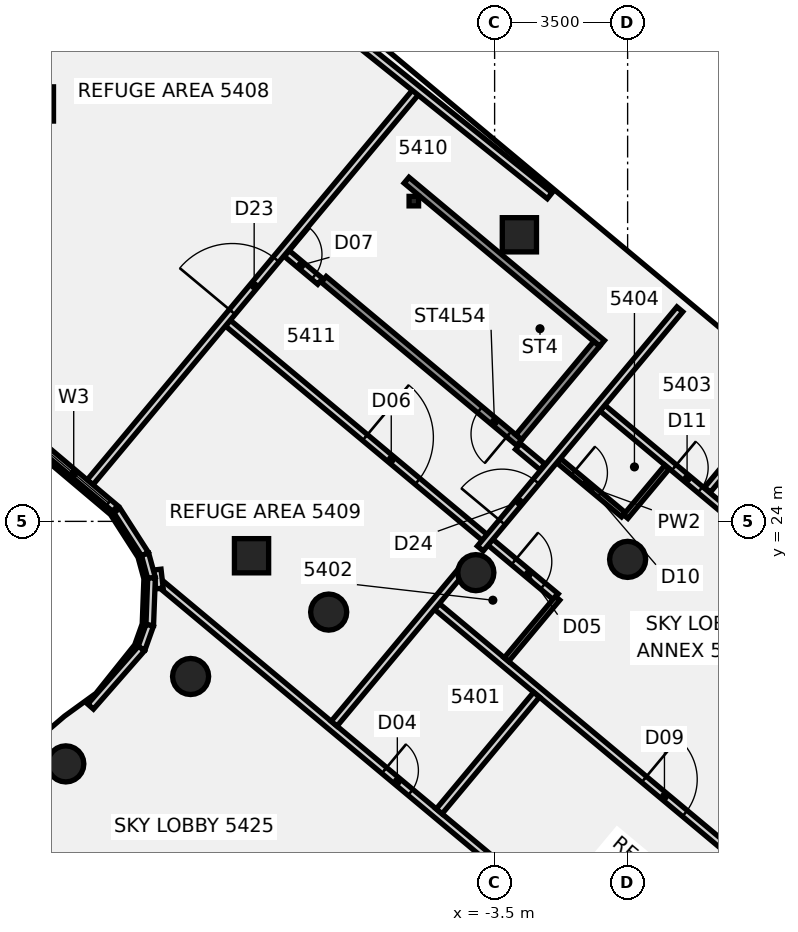
"""IFC4 building model, lengths in metres.
Left out: names, types, materials, properties, quantities, classifications, styles, units other than length and angle.
Written with IfcOpenShell. Run it as: python <this file> out.ifc"""

import sys

from ifc_helpers import new_model, si_unit, direction, frame, frame_2d, origin, origin_2d, place, context, subcontext, project, spatial, polyline, rectangle, circle, outline, extrude, element, fill, save


model = new_model("IFC4")
c1 = context("Model", 3, precision=1e-05, world=origin(), true_north=direction((0.0, 1.0)))
c2 = subcontext(c1, "Body", "Model", "MODEL_VIEW")
j1 = project(units=[si_unit("LENGTHUNIT", "METRE"), si_unit("PLANEANGLEUNIT", "RADIAN")], contexts=[c1])
p1 = place(None, origin())
s1 = spatial("IfcSite", under=j1, at=p1, CompositionType="ELEMENT")
p2 = place(p1, origin())
s2 = spatial("IfcBuilding", under=s1, at=p2, CompositionType="ELEMENT")
p3 = place(p2, frame((0.0, 0.0, 214.9)))
s3 = spatial("IfcBuildingStorey", under=s2, at=p3, CompositionType="ELEMENT", Elevation=214.9)
for number, where, z_axis, x_axis in (
    (1, (0.0, 23.0, -0.18), (0.0, 0.0, 1.0), (1.0, 0.0, 0.0)),
    (2, (-3.994, 22.651, -0.18), (0.0, 0.0, 1.0), (1.0, 0.0, 0.0)),
    (3, (-7.866, 21.613, -0.18), (0.0, 0.0, 1.0), (1.0, 0.0, 0.0)),
    (4, (-11.5, 19.919, -0.18), (0.0, 0.0, 1.0), (1.0, 0.0, 0.0)),
    (5, (-14.784, 17.619, -0.18), (0.0, 0.0, 1.0), (1.0, 0.0, 0.0)),
):
    element("IfcColumn", number, at=place(p3, frame(where, z_axis=z_axis, x_axis=x_axis)), inside=s3, PredefinedType="COLUMN", context=c2, shape_type="SweptSolid", body=[
        extrude(circle(Radius=0.475, at=origin_2d()), origin(), (0.0, 0.0, 1.0), 5.04),
    ])
p4 = place(p3, frame((-9.896, 23.096, -0.174), z_axis=(-0.00363877131, -0.03580550969, 0.999352152556), x_axis=(0.640801875223, 0.767126989756, 0.029818422132)))
e6 = element("IfcColumn", 6, at=p4, inside=s3, PredefinedType="COLUMN", context=c2, shape_type="SweptSolid", body=[
    extrude(rectangle(XDim=0.9, YDim=0.9, at=origin_2d()), origin(), (0.0, 0.0, 1.0), 5.032),
])
p5 = place(p3, frame((-2.848, 31.541, -0.174), z_axis=(-0.034396852958, -0.010576183279, 0.999352290663), x_axis=(0.766821630693, -0.641560817298, 0.019603683576)))
e7 = element("IfcColumn", 7, at=p5, inside=s3, PredefinedType="COLUMN", context=c2, shape_type="SweptSolid", body=[
    extrude(rectangle(XDim=0.9, YDim=0.9, at=origin_2d()), origin(), (0.0, 0.0, 1.0), 5.032),
])
p6 = place(p3, frame((-15.557, 34.983, -0.164), z_axis=(0.042488122715, -0.127416086189, 0.990938898423), x_axis=(0.642340953018, 0.763161584743, 0.070586795141)))
e8 = element("IfcColumn", 8, at=p6, inside=s3, PredefinedType="COLUMN", context=c2, shape_type="SweptSolid", body=[
    extrude(rectangle(XDim=0.9, YDim=0.9, at=origin_2d()), origin(), (0.0, 0.0, 1.0), 5.057),
])
p7 = place(p3, frame((-12.256, 22.329, 0.0), z_axis=(0.0, 0.0, 1.0), x_axis=(0.767726730688, -0.640777392693, 0.0)))
e9 = element("IfcWall", 9, at=p7, inside=s3, PredefinedType="PARTITIONING", context=c2, shape_type="SweptSolid", body=[
    extrude(rectangle(XDim=16.031, YDim=0.2, at=frame_2d((8.016, 0.0))), origin(), (0.0, 0.0, 1.0), 4.16),
])
p8 = place(p7, frame((7.62, 0.0, 0.0)))
e10 = element("IfcOpeningElement", 10, at=p8, cuts=e9, PredefinedType="OPENING", context=c2, shape_type="SweptSolid", body=[
    extrude(rectangle(XDim=0.9, YDim=2.1, at=frame_2d((0.45, 1.05))), frame((0.0, 0.11, 0.0), z_axis=(0.0, -1.0, 0.0), x_axis=(1.0, 0.0, 0.0)), (0.0, 0.0, 1.0), 0.22),
])
p9 = place(p3, frame((-10.519, 29.217, 0.0), z_axis=(0.0, 0.0, 1.0), x_axis=(0.767759961509, -0.640737576161, 0.0)))
e11 = element("IfcWall", 11, at=p9, inside=s3, PredefinedType="PARTITIONING", context=c2, shape_type="SweptSolid", body=[
    extrude(rectangle(XDim=11.24, YDim=0.2, at=frame_2d((5.62, 0.0))), origin(), (0.0, 0.0, 1.0), 4.16),
])
p10 = place(p9, frame((9.8, 0.0, 0.0)))
e12 = element("IfcOpeningElement", 12, at=p10, cuts=e11, PredefinedType="OPENING", context=c2, shape_type="SweptSolid", body=[
    extrude(rectangle(XDim=1.0, YDim=2.1, at=frame_2d((0.5, 1.05))), frame((0.0, 0.11, 0.0), z_axis=(0.0, -1.0, 0.0), x_axis=(1.0, 0.0, 0.0)), (0.0, 0.0, 1.0), 0.22),
])
p11 = place(p9, frame((4.7, 0.0, 0.0)))
e13 = element("IfcOpeningElement", 13, at=p11, cuts=e11, PredefinedType="OPENING", context=c2, shape_type="SweptSolid", body=[
    extrude(rectangle(XDim=1.8, YDim=2.1, at=frame_2d((0.9, 1.05))), frame((0.0, 0.11, 0.0), z_axis=(0.0, -1.0, 0.0), x_axis=(1.0, 0.0, 0.0)), (0.0, 0.0, 1.0), 0.22),
])
p12 = place(p3, frame((-8.981, 31.059, 0.0), z_axis=(0.0, 0.0, 1.0), x_axis=(0.767720658374, -0.640784667971, 0.0)))
e14 = element("IfcWall", 14, at=p12, inside=s3, PredefinedType="PARTITIONING", context=c2, shape_type="SweptSolid", body=[
    extrude(rectangle(XDim=1.16, YDim=0.2, at=frame_2d((0.58, 0.0))), origin(), (0.0, 0.0, 1.0), 4.16),
])
p13 = place(p12, frame((0.05, 0.0, 0.0)))
e15 = element("IfcOpeningElement", 15, at=p13, cuts=e14, PredefinedType="OPENING", context=c2, shape_type="SweptSolid", body=[
    extrude(rectangle(XDim=0.9, YDim=2.1, at=frame_2d((0.45, 1.05))), frame((0.0, 0.11, 0.0), z_axis=(0.0, -1.0, 0.0), x_axis=(1.0, 0.0, 0.0)), (0.0, 0.0, 1.0), 0.22),
])
p14 = place(p3, frame((-2.885, 25.971, 0.0), z_axis=(0.0, 0.0, 1.0), x_axis=(0.767840279937, -0.640641322822, 0.0)))
e16 = element("IfcWall", 16, at=p14, inside=s3, PredefinedType="PARTITIONING", context=c2, shape_type="SweptSolid", body=[
    extrude(rectangle(XDim=0.841, YDim=0.2, at=frame_2d((0.42, 0.0))), origin(), (0.0, 0.0, 1.0), 4.16),
])
p15 = place(p3, frame((-5.019, 21.761, 0.0), z_axis=(0.0, 0.0, 1.0), x_axis=(0.767714934774, -0.640791525323, 0.0)))
e17 = element("IfcWall", 17, at=p15, inside=s3, PredefinedType="PARTITIONING", context=c2, shape_type="SweptSolid", body=[
    extrude(rectangle(XDim=15.144, YDim=0.2, at=frame_2d((7.572, 0.0))), origin(), (0.0, 0.0, 1.0), 4.16),
])
p16 = place(p15, frame((7.1, 0.0, 0.0)))
e18 = element("IfcOpeningElement", 18, at=p16, cuts=e17, PredefinedType="OPENING", context=c2, shape_type="SweptSolid", body=[
    extrude(rectangle(XDim=1.4, YDim=2.1, at=frame_2d((0.7, 1.05))), frame((0.0, 0.11, 0.0), z_axis=(0.0, -1.0, 0.0), x_axis=(1.0, 0.0, 0.0)), (0.0, 0.0, 1.0), 0.22),
])
p17 = place(p3, frame((-1.815, 25.599, 0.0), z_axis=(0.0, 0.0, 1.0), x_axis=(0.767616896799, -0.640908963698, 0.0)))
e19 = element("IfcWall", 19, at=p17, inside=s3, PredefinedType="PARTITIONING", context=c2, shape_type="SweptSolid", body=[
    extrude(rectangle(XDim=2.22, YDim=0.15, at=frame_2d((1.11, 0.0))), origin(), (0.0, 0.0, 1.0), 4.16),
])
p18 = place(p17, frame((0.5, 0.0, 0.0)))
e20 = element("IfcOpeningElement", 20, at=p18, cuts=e19, PredefinedType="OPENING", context=c2, shape_type="SweptSolid", body=[
    extrude(rectangle(XDim=0.9, YDim=2.1, at=frame_2d((0.45, 1.05))), frame((0.0, 0.085, 0.0), z_axis=(0.0, -1.0, 0.0), x_axis=(1.0, 0.0, 0.0)), (0.0, 0.0, 1.0), 0.17),
])
p19 = place(p3, frame((-0.662, 26.981, 0.0), z_axis=(0.0, 0.0, 1.0), x_axis=(0.767770033975, -0.640725506695, 0.0)))
e21 = element("IfcWall", 21, at=p19, inside=s3, PredefinedType="PARTITIONING", context=c2, shape_type="SweptSolid", body=[
    extrude(rectangle(XDim=6.123, YDim=0.2, at=frame_2d((3.061, 0.0))), origin(), (0.0, 0.0, 1.0), 4.16),
])
p20 = place(p19, frame((2.45, 0.0, 0.0)))
e22 = element("IfcOpeningElement", 22, at=p20, cuts=e21, PredefinedType="OPENING", context=c2, shape_type="SweptSolid", body=[
    extrude(rectangle(XDim=0.9, YDim=2.1, at=frame_2d((0.45, 1.05))), frame((0.0, 0.11, 0.0), z_axis=(0.0, -1.0, 0.0), x_axis=(1.0, 0.0, 0.0)), (0.0, 0.0, 1.0), 0.22),
])
p21 = place(p3, frame((-14.145, 25.028, 0.0), z_axis=(0.0, 0.0, 1.0), x_axis=(0.640714977606, 0.767778820671, 0.0)))
e23 = element("IfcWall", 23, at=p21, inside=s3, PredefinedType="PARTITIONING", context=c2, shape_type="SweptSolid", body=[
    extrude(rectangle(XDim=13.438, YDim=0.2, at=frame_2d((6.719, 0.0))), origin(), (0.0, 0.0, 1.0), 4.16),
])
p22 = place(p21, frame((5.84, 0.0, 0.0)))
e24 = element("IfcOpeningElement", 24, at=p22, cuts=e23, PredefinedType="OPENING", context=c2, shape_type="SweptSolid", body=[
    extrude(rectangle(XDim=1.8, YDim=2.1, at=frame_2d((0.9, 1.05))), frame((0.0, 0.11, 0.0), z_axis=(0.0, -1.0, 0.0), x_axis=(1.0, 0.0, 0.0)), (0.0, 0.0, 1.0), 0.22),
])
p23 = place(p3, frame((-7.723, 18.677, 0.0), z_axis=(0.0, 0.0, 1.0), x_axis=(0.640682845605, 0.767805633834, 0.0)))
e25 = element("IfcWall", 25, at=p23, inside=s3, PredefinedType="PARTITIONING", context=c2, shape_type="SweptSolid", body=[
    extrude(rectangle(XDim=5.491, YDim=0.2, at=frame_2d((2.745, 0.0))), origin(), (0.0, 0.0, 1.0), 4.16),
])
p24 = place(p3, frame((-3.877, 23.286, 0.0), z_axis=(0.0, 0.0, 1.0), x_axis=(0.640673591949, 0.767813355302, 0.0)))
e26 = element("IfcWall", 26, at=p24, inside=s3, PredefinedType="PARTITIONING", context=c2, shape_type="SweptSolid", body=[
    extrude(rectangle(XDim=8.196, YDim=0.2, at=frame_2d((4.098, 0.0))), origin(), (0.0, 0.0, 1.0), 4.16),
])
p25 = place(p24, frame((0.897, 0.0, 0.0)))
e27 = element("IfcOpeningElement", 27, at=p25, cuts=e26, PredefinedType="OPENING", context=c2, shape_type="SweptSolid", body=[
    extrude(rectangle(XDim=1.4, YDim=2.1, at=frame_2d((0.7, 1.05))), frame((0.0, 0.11, 0.0), z_axis=(0.0, -1.0, 0.0), x_axis=(1.0, 0.0, 0.0)), (0.0, 0.0, 1.0), 0.22),
])
p26 = place(p3, frame((-4.959, 16.37, 0.0), z_axis=(0.0, 0.0, 1.0), x_axis=(0.64071252412, 0.76778086811, 0.0)))
e28 = element("IfcWall", 28, at=p26, inside=s3, PredefinedType="PARTITIONING", context=c2, shape_type="SweptSolid", body=[
    extrude(rectangle(XDim=4.0, YDim=0.2, at=frame_2d((2.0, 0.0))), origin(), (0.0, 0.0, 1.0), 4.16),
])
p27 = place(p3, frame((2.101, 24.831, 0.0), z_axis=(0.0, 0.0, 1.0), x_axis=(0.640706543974, 0.767785858497, 0.0)))
e29 = element("IfcWall", 29, at=p27, inside=s3, PredefinedType="PARTITIONING", context=c2, shape_type="SweptSolid", body=[
    extrude(rectangle(XDim=2.713, YDim=0.2, at=frame_2d((1.356, 0.0))), origin(), (0.0, 0.0, 1.0), 4.16),
])
p28 = place(p3, frame((-3.189, 20.364, 0.0), z_axis=(0.0, 0.0, 1.0), x_axis=(0.640573180371, 0.767897128911, 0.0)))
e30 = element("IfcWall", 30, at=p28, inside=s3, PredefinedType="PARTITIONING", context=c2, shape_type="SweptSolid", body=[
    extrude(rectangle(XDim=2.1, YDim=0.15, at=frame_2d((1.05, 0.0))), origin(), (0.0, 0.0, 1.0), 4.16),
])
p29 = place(p3, frame((-0.051, 24.125, 0.0), z_axis=(0.0, 0.0, 1.0), x_axis=(0.640565579042, 0.76790346981, 0.0)))
e31 = element("IfcWall", 31, at=p29, inside=s3, PredefinedType="PARTITIONING", context=c2, shape_type="SweptSolid", body=[
    extrude(rectangle(XDim=1.701, YDim=0.15, at=frame_2d((0.85, 0.0))), origin(), (0.0, 0.0, 1.0), 4.16),
])
p30 = place(p3, frame((-12.377, 22.731, 0.0), z_axis=(0.0, 0.0, 1.0), x_axis=(0.112307083986, -0.993673547442, 0.0)))
e32 = element("IfcWall", 32, at=p30, inside=s3, PredefinedType="PARTITIONING", context=c2, shape_type="SweptSolid", body=[
    extrude(rectangle(XDim=0.5, YDim=0.2, at=frame_2d((0.25, 0.0))), origin(), (0.0, 0.0, 1.0), 4.16),
])
p31 = place(p3, frame((-2.051, 32.569, 0.0), z_axis=(0.0, 0.0, 1.0), x_axis=(-0.780052154806, 0.625714500218, 0.0)))
e33 = element("IfcWall", 33, at=p31, inside=s3, PredefinedType="SOLIDWALL", context=c2, shape_type="SweptSolid", body=[
    extrude(rectangle(XDim=12.698, YDim=0.2, at=frame_2d((6.349, 0.0))), origin(), (0.0, 0.0, 1.0), 4.86),
])
p32 = place(p31, frame((10.098, 0.0, 1.4)))
e34 = element("IfcOpeningElement", 34, at=p32, cuts=e33, PredefinedType="OPENING", context=c2, shape_type="SweptSolid", body=[
    extrude(rectangle(XDim=2.4, YDim=2.1, at=frame_2d((1.2, 1.05))), frame((0.0, 0.11, 0.0), z_axis=(0.0, -1.0, 0.0), x_axis=(1.0, 0.0, 0.0)), (0.0, 0.0, 1.0), 0.22),
])
p33 = place(p3, frame((-13.687, 39.85, 0.0), z_axis=(0.0, 0.0, 1.0), x_axis=(-0.623074903355, -0.78216217296, 0.0)))
e35 = element("IfcWall", 35, at=p33, inside=s3, PredefinedType="SOLIDWALL", context=c2, shape_type="SweptSolid", body=[
    extrude(rectangle(XDim=10.833, YDim=0.2, at=frame_2d((5.417, 0.0))), origin(), (0.0, 0.0, 1.0), 4.86),
])
p34 = place(p3, frame((-19.772, 29.645, 0.0), z_axis=(0.0, 0.0, 1.0), x_axis=(0.764192749459, -0.64498793917, 0.0)))
e36 = element("IfcWall", 36, at=p34, inside=s3, PredefinedType="SOLIDWALL", context=c2, shape_type="SweptSolid", body=[
    extrude(rectangle(XDim=8.227, YDim=0.2, at=frame_2d((4.114, 0.0))), origin(), (0.0, 0.0, 1.0), 4.86),
])
p35 = place(p34, frame((5.6, 0.0, 1.4)))
e37 = element("IfcOpeningElement", 37, at=p35, cuts=e36, PredefinedType="OPENING", context=c2, shape_type="SweptSolid", body=[
    extrude(rectangle(XDim=2.4, YDim=2.1, at=frame_2d((1.2, 1.05))), frame((0.0, 0.11, 0.0), z_axis=(0.0, -1.0, 0.0), x_axis=(1.0, 0.0, 0.0)), (0.0, 0.0, 1.0), 0.22),
])
p36 = place(p3, frame((-13.438, 24.287, 0.0), z_axis=(0.0, 0.0, 1.0), x_axis=(0.540343058881, -0.841444816205, 0.0)))
e38 = element("IfcWall", 38, at=p36, inside=s3, PredefinedType="SOLIDWALL", context=c2, shape_type="SweptSolid", body=[
    extrude(rectangle(XDim=1.369, YDim=0.2, at=frame_2d((0.685, 0.0))), origin(), (0.0, 0.0, 1.0), 4.86),
])
p37 = place(p3, frame((-12.698, 23.135, 0.0), z_axis=(0.0, 0.0, 1.0), x_axis=(0.263532690811, -0.964650465648, 0.0)))
e39 = element("IfcWall", 39, at=p37, inside=s3, PredefinedType="SOLIDWALL", context=c2, shape_type="SweptSolid", body=[
    extrude(rectangle(XDim=0.647, YDim=0.2, at=frame_2d((0.323, 0.0))), origin(), (0.0, 0.0, 1.0), 4.86),
])
p38 = place(p3, frame((-12.528, 22.511, 0.0), z_axis=(0.0, 0.0, 1.0), x_axis=(-0.037627776093, -0.999291824477, 0.0)))
e40 = element("IfcWall", 40, at=p38, inside=s3, PredefinedType="SOLIDWALL", context=c2, shape_type="SweptSolid", body=[
    extrude(rectangle(XDim=1.246, YDim=0.2, at=frame_2d((0.623, 0.0))), origin(), (0.0, 0.0, 1.0), 4.86),
])
p39 = place(p3, frame((-12.575, 21.266, 0.0), z_axis=(0.0, 0.0, 1.0), x_axis=(-0.335669576077, -0.9419797958, 0.0)))
e41 = element("IfcWall", 41, at=p39, inside=s3, PredefinedType="SOLIDWALL", context=c2, shape_type="SweptSolid", body=[
    extrude(rectangle(XDim=0.649, YDim=0.2, at=frame_2d((0.325, 0.0))), origin(), (0.0, 0.0, 1.0), 4.86),
])
p40 = place(p3, frame((-12.793, 20.655, 0.0), z_axis=(0.0, 0.0, 1.0), x_axis=(-0.658742820899, -0.752368191722, 0.0)))
e42 = element("IfcWall", 42, at=p40, inside=s3, PredefinedType="SOLIDWALL", context=c2, shape_type="SweptSolid", body=[
    extrude(rectangle(XDim=2.031, YDim=0.2, at=frame_2d((1.016, 0.0))), origin(), (0.0, 0.0, 1.0), 4.86),
])
p41 = place(p3, frame((-2.852, 26.074, -0.18), z_axis=(0.0, 0.0, 1.0), x_axis=(-0.767728232678, 0.640775593129, 0.0)))
e43 = element("IfcWall", 43, at=p41, inside=s3, PredefinedType="SHEAR", context=c2, shape_type="SweptSolid", body=[
    extrude(rectangle(XDim=6.7, YDim=0.2, at=frame_2d((3.35, 0.0))), origin(), (0.0, 0.0, 1.0), 4.444),
])
p42 = place(p41, frame((0.35, 0.0, 0.0)))
e44 = element("IfcOpeningElement", 44, at=p42, cuts=e43, PredefinedType="OPENING", context=c2, shape_type="SweptSolid", body=[
    extrude(rectangle(XDim=1.0, YDim=2.1, at=frame_2d((0.5, 1.05))), frame((0.0, 0.11, 0.0), z_axis=(0.0, -1.0, 0.0), x_axis=(1.0, 0.0, 0.0)), (0.0, 0.0, 1.0), 0.22),
])
p43 = place(p3, frame((-0.674, 28.684, -0.18), z_axis=(0.0, 0.0, 1.0), x_axis=(-0.767713270537, 0.640793519195, 0.0)))
e45 = element("IfcWall", 45, at=p43, inside=s3, PredefinedType="SHEAR", context=c2, shape_type="SweptSolid", body=[
    extrude(rectangle(XDim=6.7, YDim=0.2, at=frame_2d((3.35, 0.0))), origin(), (0.0, 0.0, 1.0), 4.444),
])
p44 = place(p3, frame((-0.814, 28.671, -0.18), z_axis=(0.0, 0.0, 1.0), x_axis=(-0.640777035898, -0.767727028485, 0.0)))
e46 = element("IfcWall", 46, at=p44, inside=s3, PredefinedType="SHEAR", context=c2, shape_type="SweptSolid", body=[
    extrude(rectangle(XDim=3.2, YDim=0.2, at=frame_2d((1.6, 0.0))), origin(), (0.0, 0.0, 1.0), 5.04),
])
p45 = place(p3, frame((0.0, 0.0, -0.18)))
e47 = element("IfcWall", 47, at=p45, inside=s3, PredefinedType="SHEAR", context=c2, shape_type="SweptSolid", body=[
    extrude(outline(polyline([(-5.728, 32.772), (-5.881, 32.9), (-7.932, 30.444), (-7.778, 30.316), (-5.728, 32.772)])), origin(), (0.0, 0.0, 1.0), 4.444),
])
p46 = place(p3, frame((-5.626, 32.427, -0.18), z_axis=(0.0, 0.0, 1.0), x_axis=(1.0, 0.0, 0.0)))
e48 = element("IfcColumn", 48, at=p46, inside=s3, PredefinedType="COLUMN", context=c2, shape_type="SweptSolid", body=[
    extrude(rectangle(XDim=0.25, YDim=0.25, at=origin_2d()), origin(), (0.0, 0.0, 1.0), 2.48),
])
p47 = place(p8, origin())
e49 = element("IfcDoor", 49, at=p47, inside=s3, OperationType="SINGLE_SWING_LEFT", PredefinedType="DOOR", context=c2, shape_type="SweptSolid", body=[
    extrude(rectangle(XDim=0.9, YDim=2.1, at=frame_2d((0.45, 1.05))), frame((0.0, 0.025, 0.0), z_axis=(0.0, -1.0, 0.0), x_axis=(1.0, 0.0, 0.0)), (0.0, 0.0, 1.0), 0.05),
])
fill(e10, e49)
p48 = place(p10, frame((1.0, 0.0, 0.0), z_axis=(0.0, 0.0, 1.0), x_axis=(-1.0, 0.0, 0.0)))
e50 = element("IfcDoor", 50, at=p48, inside=s3, OperationType="SINGLE_SWING_RIGHT", PredefinedType="DOOR", context=c2, shape_type="SweptSolid", body=[
    extrude(rectangle(XDim=1.0, YDim=2.1, at=frame_2d((0.5, 1.05))), frame((0.0, 0.025, 0.0), z_axis=(0.0, -1.0, 0.0), x_axis=(1.0, 0.0, 0.0)), (0.0, 0.0, 1.0), 0.05),
])
fill(e12, e50)
p49 = place(p11, frame((1.8, 0.0, 0.0), z_axis=(0.0, 0.0, 1.0), x_axis=(-1.0, 0.0, 0.0)))
e51 = element("IfcDoor", 51, at=p49, inside=s3, OperationType="DOUBLE_DOOR_SINGLE_SWING", PredefinedType="DOOR", context=c2, shape_type="SweptSolid", body=[
    extrude(rectangle(XDim=1.8, YDim=2.1, at=frame_2d((0.9, 1.05))), frame((0.0, 0.025, 0.0), z_axis=(0.0, -1.0, 0.0), x_axis=(1.0, 0.0, 0.0)), (0.0, 0.0, 1.0), 0.05),
])
fill(e13, e51)
p50 = place(p13, origin())
e52 = element("IfcDoor", 52, at=p50, inside=s3, OperationType="SINGLE_SWING_RIGHT", PredefinedType="DOOR", context=c2, shape_type="SweptSolid", body=[
    extrude(rectangle(XDim=0.9, YDim=2.1, at=frame_2d((0.45, 1.05))), frame((0.0, 0.025, 0.0), z_axis=(0.0, -1.0, 0.0), x_axis=(1.0, 0.0, 0.0)), (0.0, 0.0, 1.0), 0.05),
])
fill(e15, e52)
p51 = place(p16, frame((1.4, 0.0, 0.0), z_axis=(0.0, 0.0, 1.0), x_axis=(-1.0, 0.0, 0.0)))
e53 = element("IfcDoor", 53, at=p51, inside=s3, OperationType="DOUBLE_DOOR_SINGLE_SWING", PredefinedType="DOOR", context=c2, shape_type="SweptSolid", body=[
    extrude(rectangle(XDim=1.4, YDim=2.1, at=frame_2d((0.7, 1.05))), frame((0.0, 0.025, 0.0), z_axis=(0.0, -1.0, 0.0), x_axis=(1.0, 0.0, 0.0)), (0.0, 0.0, 1.0), 0.05),
])
fill(e18, e53)
p52 = place(p18, origin())
e54 = element("IfcDoor", 54, at=p52, inside=s3, OperationType="SINGLE_SWING_RIGHT", PredefinedType="DOOR", context=c2, shape_type="SweptSolid", body=[
    extrude(rectangle(XDim=0.9, YDim=2.1, at=frame_2d((0.45, 1.05))), frame((0.0, 0.025, 0.0), z_axis=(0.0, -1.0, 0.0), x_axis=(1.0, 0.0, 0.0)), (0.0, 0.0, 1.0), 0.05),
])
fill(e20, e54)
p53 = place(p20, origin())
e55 = element("IfcDoor", 55, at=p53, inside=s3, OperationType="SINGLE_SWING_RIGHT", PredefinedType="DOOR", context=c2, shape_type="SweptSolid", body=[
    extrude(rectangle(XDim=0.9, YDim=2.1, at=frame_2d((0.45, 1.05))), frame((0.0, 0.025, 0.0), z_axis=(0.0, -1.0, 0.0), x_axis=(1.0, 0.0, 0.0)), (0.0, 0.0, 1.0), 0.05),
])
fill(e22, e55)
p54 = place(p22, origin())
e56 = element("IfcDoor", 56, at=p54, inside=s3, OperationType="DOUBLE_DOOR_SINGLE_SWING", PredefinedType="DOOR", context=c2, shape_type="SweptSolid", body=[
    extrude(rectangle(XDim=1.8, YDim=2.1, at=frame_2d((0.9, 1.05))), frame((0.0, 0.025, 0.0), z_axis=(0.0, -1.0, 0.0), x_axis=(1.0, 0.0, 0.0)), (0.0, 0.0, 1.0), 0.05),
])
fill(e24, e56)
p55 = place(p25, frame((1.4, 0.0, 0.0), z_axis=(0.0, 0.0, 1.0), x_axis=(-1.0, 0.0, 0.0)))
e57 = element("IfcDoor", 57, at=p55, inside=s3, OperationType="DOUBLE_DOOR_SINGLE_SWING", PredefinedType="DOOR", context=c2, shape_type="SweptSolid", body=[
    extrude(rectangle(XDim=1.4, YDim=2.1, at=frame_2d((0.7, 1.05))), frame((0.0, 0.025, 0.0), z_axis=(0.0, -1.0, 0.0), x_axis=(1.0, 0.0, 0.0)), (0.0, 0.0, 1.0), 0.05),
])
fill(e27, e57)
p56 = place(p35, origin())
e58 = element("IfcWindow", 58, at=p56, inside=s3, PartitioningType="SINGLE_PANEL", PredefinedType="WINDOW", context=c2, shape_type="SweptSolid", body=[
    extrude(rectangle(XDim=2.4, YDim=2.1, at=frame_2d((1.2, 1.05))), frame((0.0, 0.03, 0.0), z_axis=(0.0, -1.0, 0.0), x_axis=(1.0, 0.0, 0.0)), (0.0, 0.0, 1.0), 0.06),
])
fill(e37, e58)
p57 = place(p42, origin())
e59 = element("IfcDoor", 59, at=p57, inside=s3, OperationType="SINGLE_SWING_LEFT", PredefinedType="DOOR", context=c2, shape_type="SweptSolid", body=[
    extrude(rectangle(XDim=1.0, YDim=2.1, at=frame_2d((0.5, 1.05))), frame((0.0, 0.025, 0.0), z_axis=(0.0, -1.0, 0.0), x_axis=(1.0, 0.0, 0.0)), (0.0, 0.0, 1.0), 0.05),
])
fill(e44, e59)
save(model, sys.argv[1])
